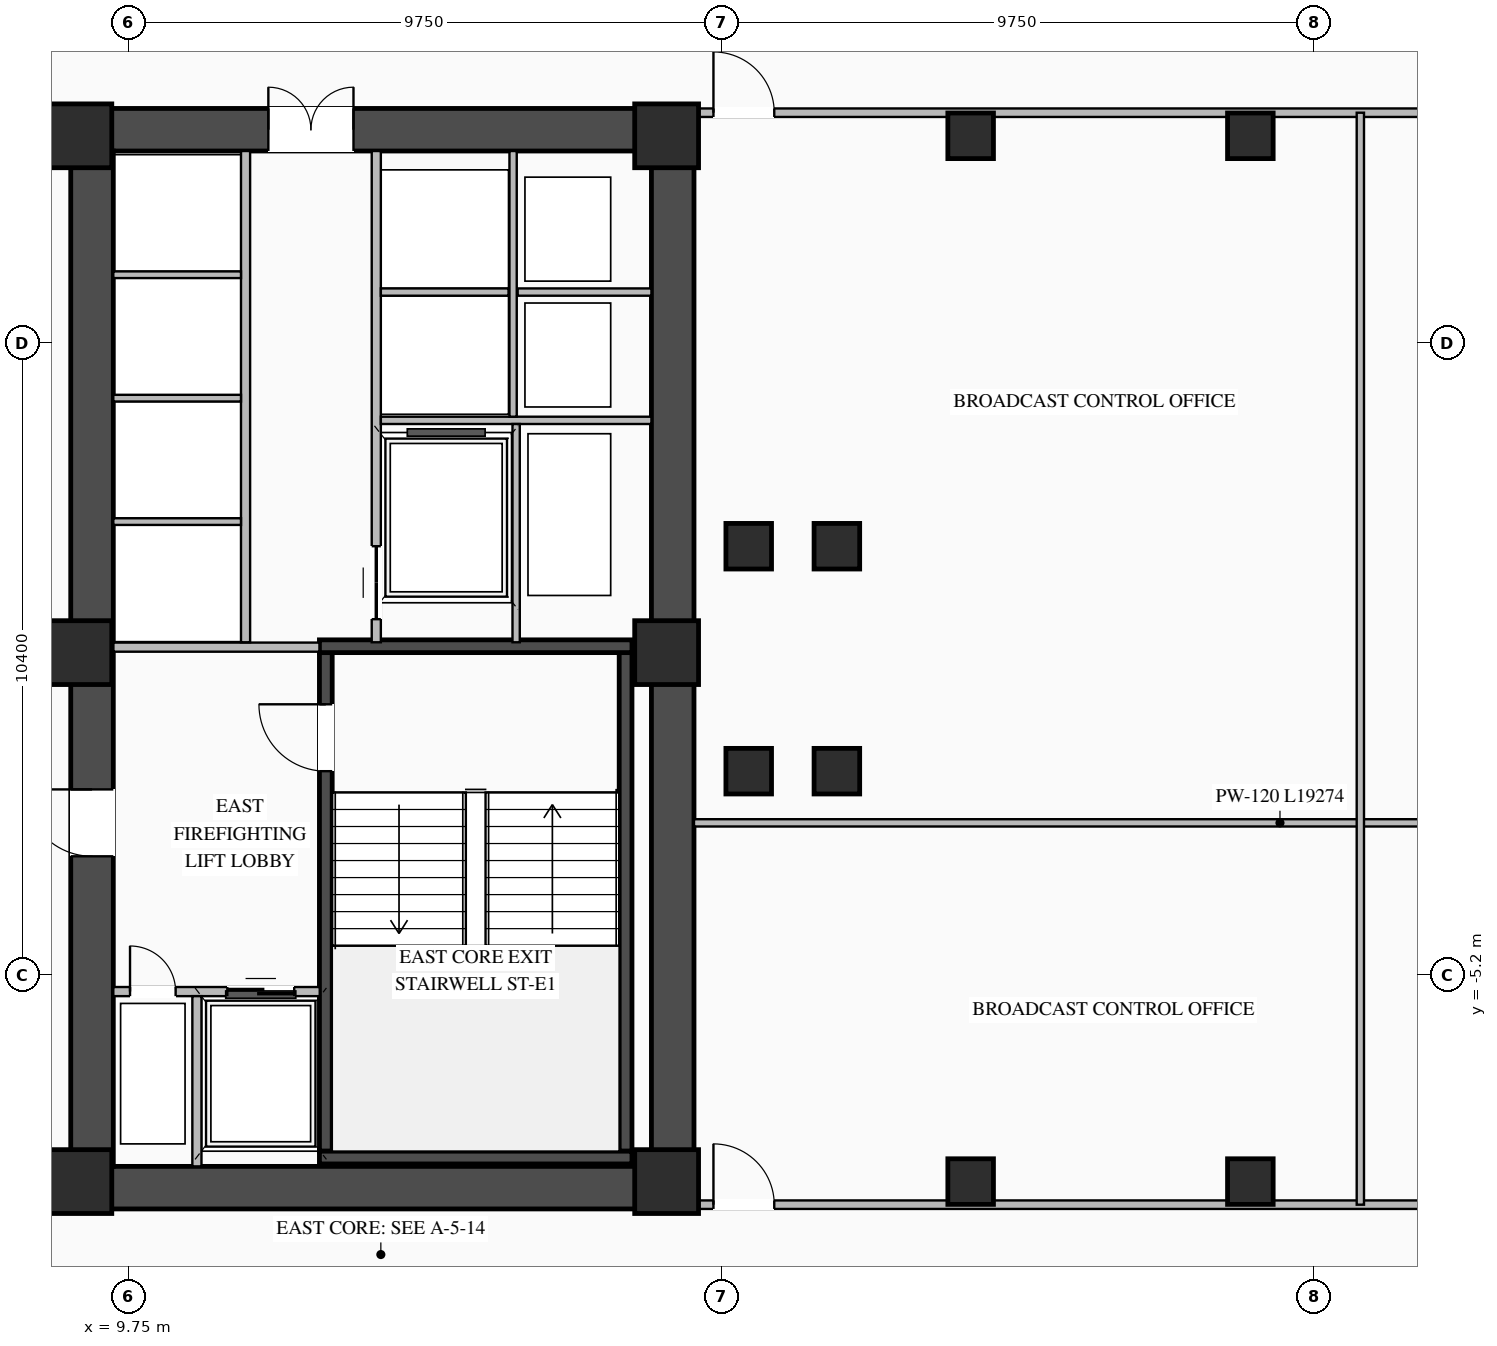
"""IFC4 building model, lengths in metres.
Left out: names, types, materials, properties, quantities, classifications, styles, units other than length and angle.
Written with IfcOpenShell. Run it as: python <this file> out.ifc"""

import sys

from ifc_helpers import new_model, si_unit, direction, frame, frame_2d, origin, origin_2d, place, context, subcontext, project, spatial, rectangle, i_section, extrude, element, fill, save


model = new_model("IFC4")
c1 = context("Model", 3, precision=1e-05, world=origin(), true_north=direction((0.0, 1.0)))
c2 = subcontext(c1, "Body", "Model", "MODEL_VIEW")
j1 = project(units=[si_unit("LENGTHUNIT", "METRE"), si_unit("PLANEANGLEUNIT", "RADIAN")], contexts=[c1])
p1 = place(None, origin())
s1 = spatial("IfcSite", under=j1, at=p1, CompositionType="ELEMENT")
p2 = place(p1, origin())
s2 = spatial("IfcBuilding", under=s1, at=p2, CompositionType="ELEMENT")
p3 = place(p2, frame((0.0, 0.0, 74.2)))
s3 = spatial("IfcBuildingStorey", under=s2, at=p3, CompositionType="ELEMENT", Elevation=74.2)
p4 = place(p3, frame((8.8, -8.7, 0.0), z_axis=(0.0, 0.0, 1.0), x_axis=(1.0, 0.0, 0.0)))
e1 = element("IfcWall", 1, at=p4, inside=s3, PredefinedType="SHEAR", context=c2, shape_type="SweptSolid", body=[
    extrude(rectangle(XDim=10.25, YDim=0.7, at=frame_2d((5.125, 0.0))), origin(), (0.0, 0.0, 1.0), 3.27),
])
p5 = place(p3, frame((8.8, 8.7, 0.0), z_axis=(0.0, 0.0, 1.0), x_axis=(1.0, 0.0, 0.0)))
e2 = element("IfcWall", 2, at=p5, inside=s3, PredefinedType="SHEAR", context=c2, shape_type="SweptSolid", body=[
    extrude(rectangle(XDim=10.25, YDim=0.7, at=frame_2d((5.125, 0.0))), origin(), (0.0, 0.0, 1.0), 3.27),
])
p6 = place(p5, frame((3.25, 0.0, 0.0)))
e3 = element("IfcOpeningElement", 3, at=p6, cuts=e2, PredefinedType="OPENING", context=c2, shape_type="SweptSolid", body=[
    extrude(rectangle(XDim=1.4, YDim=2.05, at=frame_2d((0.7, 1.025))), frame((0.0, 0.36, 0.0), z_axis=(0.0, -1.0, 0.0), x_axis=(1.0, 0.0, 0.0)), (0.0, 0.0, 1.0), 0.72),
])
p7 = place(p3, frame((9.15, -8.35, 0.0), z_axis=(0.0, 0.0, 1.0), x_axis=(0.0, 1.0, 0.0)))
e4 = element("IfcWall", 4, at=p7, inside=s3, PredefinedType="SHEAR", context=c2, shape_type="SweptSolid", body=[
    extrude(rectangle(XDim=16.7, YDim=0.7, at=frame_2d((8.35, 0.0))), origin(), (0.0, 0.0, 1.0), 3.27),
])
p8 = place(p7, frame((5.1, 0.0, 0.0)))
e5 = element("IfcOpeningElement", 5, at=p8, cuts=e4, PredefinedType="OPENING", context=c2, shape_type="SweptSolid", body=[
    extrude(rectangle(XDim=1.1, YDim=2.08, at=frame_2d((0.55, 1.04))), frame((0.0, 0.36, 0.0), z_axis=(0.0, -1.0, 0.0), x_axis=(1.0, 0.0, 0.0)), (0.0, 0.0, 1.0), 0.72),
])
p9 = place(p3, frame((18.7, -8.35, 0.0), z_axis=(0.0, 0.0, 1.0), x_axis=(0.0, 1.0, 0.0)))
e6 = element("IfcWall", 6, at=p9, inside=s3, PredefinedType="SHEAR", context=c2, shape_type="SweptSolid", body=[
    extrude(rectangle(XDim=16.7, YDim=0.7, at=frame_2d((8.35, 0.0))), origin(), (0.0, 0.0, 1.0), 3.27),
])
p10 = place(p3, frame((12.995, -8.1, 0.0), z_axis=(0.0, 0.0, 1.0), x_axis=(0.0, 1.0, 0.0)))
e7 = element("IfcWall", 7, at=p10, inside=s3, PredefinedType="SHEAR", context=c2, shape_type="SweptSolid", body=[
    extrude(rectangle(XDim=8.2, YDim=0.21, at=frame_2d((4.1, 0.0))), origin(), (0.0, 0.0, 1.0), 3.27),
])
p11 = place(p10, frame((6.25, 0.0, 0.0)))
e8 = element("IfcOpeningElement", 8, at=p11, cuts=e7, PredefinedType="OPENING", context=c2, shape_type="SweptSolid", body=[
    extrude(rectangle(XDim=1.1, YDim=2.15, at=frame_2d((0.55, 1.075))), frame((0.0, 0.115, 0.0), z_axis=(0.0, -1.0, 0.0), x_axis=(1.0, 0.0, 0.0)), (0.0, 0.0, 1.0), 0.23),
])
p12 = place(p3, frame((17.925, -8.1, 0.0), z_axis=(0.0, 0.0, 1.0), x_axis=(0.0, 1.0, 0.0)))
e9 = element("IfcWall", 9, at=p12, inside=s3, PredefinedType="SHEAR", context=c2, shape_type="SweptSolid", body=[
    extrude(rectangle(XDim=8.2, YDim=0.21, at=frame_2d((4.1, 0.0))), origin(), (0.0, 0.0, 1.0), 3.27),
])
for number, where, z_axis, x_axis in (
    (10, (12.89, -8.205, 0.0), (0.0, 0.0, 1.0), (1.0, 0.0, 0.0)),
    (11, (18.03, 0.205, 0.0), (0.0, 0.0, 1.0), (-1.0, 0.0, 0.0)),
):
    element("IfcWall", number, at=place(p3, frame(where, z_axis=z_axis, x_axis=x_axis)), inside=s3, PredefinedType="SHEAR", context=c2, shape_type="SweptSolid", body=[
        extrude(rectangle(XDim=5.14, YDim=0.21, at=frame_2d((2.57, 0.0))), origin(), (0.0, 0.0, 1.0), 3.27),
    ])
for number, where, z_axis, x_axis in (
    (12, (8.95, -8.6, 0.0), (0.0, 0.0, 1.0), (1.0, 0.0, 0.0)),
    (13, (8.95, 0.1, 0.0), (0.0, 0.0, 1.0), (1.0, 0.0, 0.0)),
    (14, (8.95, 8.6, 0.0), (0.0, 0.0, 1.0), (1.0, 0.0, 0.0)),
    (15, (18.6, -8.6, 0.0), (0.0, 0.0, 1.0), (1.0, 0.0, 0.0)),
    (16, (18.6, 0.1, 0.0), (0.0, 0.0, 1.0), (1.0, 0.0, 0.0)),
    (17, (18.6, 8.6, 0.0), (0.0, 0.0, 1.0), (1.0, 0.0, 0.0)),
):
    element("IfcColumn", number, at=place(p3, frame(where, z_axis=z_axis, x_axis=x_axis)), inside=s3, PredefinedType="COLUMN", context=c2, shape_type="SweptSolid", body=[
        extrude(rectangle(XDim=1.05, YDim=1.05, at=origin_2d()), origin(), (0.0, 0.0, 1.0), 3.45),
    ])
for number, where, z_axis, x_axis in (
    (18, (19.95, -1.85, 0.0), (0.0, 0.0, 1.0), (1.0, 0.0, 0.0)),
    (19, (19.95, 1.85, 0.0), (0.0, 0.0, 1.0), (1.0, 0.0, 0.0)),
    (20, (21.4, -1.85, 0.0), (0.0, 0.0, 1.0), (1.0, 0.0, 0.0)),
    (21, (21.4, 1.85, 0.0), (0.0, 0.0, 1.0), (1.0, 0.0, 0.0)),
    (22, (23.6, -8.6, 0.0), (0.0, 0.0, 1.0), (1.0, 0.0, 0.0)),
    (23, (23.6, 8.6, 0.0), (0.0, 0.0, 1.0), (1.0, 0.0, 0.0)),
    (24, (28.2, -8.6, 0.0), (0.0, 0.0, 1.0), (1.0, 0.0, 0.0)),
    (25, (28.2, 8.6, 0.0), (0.0, 0.0, 1.0), (1.0, 0.0, 0.0)),
):
    element("IfcColumn", number, at=place(p3, frame(where, z_axis=z_axis, x_axis=x_axis)), inside=s3, PredefinedType="COLUMN", context=c2, shape_type="SweptSolid", body=[
        extrude(i_section(OverallWidth=0.75, OverallDepth=0.75, WebThickness=0.03, FlangeThickness=0.044, at=origin_2d()), origin(), (0.0, 0.0, 1.0), 3.45),
    ])
p13 = place(p3, frame((9.5, -5.475, 0.0), z_axis=(0.0, 0.0, 1.0), x_axis=(1.0, 0.0, 0.0)))
e26 = element("IfcWall", 26, at=p13, inside=s3, PredefinedType="STANDARD", context=c2, shape_type="SweptSolid", body=[
    extrude(rectangle(XDim=3.395, YDim=0.15, at=frame_2d((1.698, 0.0))), origin(), (0.0, 0.0, 1.0), 3.25),
])
p14 = place(p13, frame((1.875, 0.0, 0.0)))
e27 = element("IfcOpeningElement", 27, at=p14, cuts=e26, PredefinedType="OPENING", context=c2, shape_type="SweptSolid", body=[
    extrude(rectangle(XDim=1.1, YDim=2.15, at=frame_2d((0.55, 1.075))), frame((0.0, 0.085, 0.0), z_axis=(0.0, -1.0, 0.0), x_axis=(1.0, 0.0, 0.0)), (0.0, 0.0, 1.0), 0.17),
])
p15 = place(p13, frame((0.275, 0.0, 0.0)))
e28 = element("IfcOpeningElement", 28, at=p15, cuts=e26, PredefinedType="OPENING", context=c2, shape_type="SweptSolid", body=[
    extrude(rectangle(XDim=0.75, YDim=2.05, at=frame_2d((0.375, 1.025))), frame((0.0, 0.085, 0.0), z_axis=(0.0, -1.0, 0.0), x_axis=(1.0, 0.0, 0.0)), (0.0, 0.0, 1.0), 0.17),
])
p16 = place(p3, frame((10.875, -8.35, 0.0), z_axis=(0.0, 0.0, 1.0), x_axis=(0.0, 1.0, 0.0)))
e29 = element("IfcWall", 29, at=p16, inside=s3, PredefinedType="STANDARD", context=c2, shape_type="SweptSolid", body=[
    extrude(rectangle(XDim=2.8, YDim=0.15, at=frame_2d((1.4, 0.0))), origin(), (0.0, 0.0, 1.0), 3.25),
])
p17 = place(p3, frame((9.5, 0.19, 0.0), z_axis=(0.0, 0.0, 1.0), x_axis=(1.0, 0.0, 0.0)))
e30 = element("IfcWall", 30, at=p17, inside=s3, PredefinedType="STANDARD", context=c2, shape_type="SweptSolid", body=[
    extrude(rectangle(XDim=3.39, YDim=0.15, at=frame_2d((1.695, 0.0))), origin(), (0.0, 0.0, 1.0), 2.645),
])
p18 = place(p3, frame((11.675, 0.27, 0.0), z_axis=(0.0, 0.0, 1.0), x_axis=(0.0, 1.0, 0.0)))
e31 = element("IfcWall", 31, at=p18, inside=s3, PredefinedType="STANDARD", context=c2, shape_type="SweptSolid", body=[
    extrude(rectangle(XDim=8.08, YDim=0.15, at=frame_2d((4.04, 0.0))), origin(), (0.0, 0.0, 1.0), 3.25),
])
for number, where, z_axis, x_axis in (
    (32, (9.5, 2.255, 0.0), (0.0, 0.0, 1.0), (1.0, 0.0, 0.0)),
    (33, (9.5, 4.285, 0.0), (0.0, 0.0, 1.0), (1.0, 0.0, 0.0)),
    (34, (9.5, 6.315, 0.0), (0.0, 0.0, 1.0), (1.0, 0.0, 0.0)),
):
    element("IfcWall", number, at=place(p3, frame(where, z_axis=z_axis, x_axis=x_axis)), inside=s3, PredefinedType="STANDARD", context=c2, shape_type="SweptSolid", body=[
        extrude(rectangle(XDim=2.1, YDim=0.11, at=frame_2d((1.05, 0.0))), origin(), (0.0, 0.0, 1.0), 3.25),
    ])
p19 = place(p3, frame((13.825, 0.27, 0.0), z_axis=(0.0, 0.0, 1.0), x_axis=(0.0, 1.0, 0.0)))
e35 = element("IfcWall", 35, at=p19, inside=s3, PredefinedType="STANDARD", context=c2, shape_type="SweptSolid", body=[
    extrude(rectangle(XDim=8.08, YDim=0.15, at=frame_2d((4.04, 0.0))), origin(), (0.0, 0.0, 1.0), 3.25),
])
p20 = place(p19, frame((0.38, 0.0, 0.0)))
e36 = element("IfcOpeningElement", 36, at=p20, cuts=e35, PredefinedType="OPENING", context=c2, shape_type="SweptSolid", body=[
    extrude(rectangle(XDim=1.2, YDim=2.1, at=frame_2d((0.6, 1.05))), frame((0.0, 0.085, 0.0), z_axis=(0.0, -1.0, 0.0), x_axis=(1.0, 0.0, 0.0)), (0.0, 0.0, 1.0), 0.17),
])
p21 = place(p3, frame((13.9, 3.92, 0.0), z_axis=(0.0, 0.0, 1.0), x_axis=(1.0, 0.0, 0.0)))
e37 = element("IfcWall", 37, at=p21, inside=s3, PredefinedType="STANDARD", context=c2, shape_type="SweptSolid", body=[
    extrude(rectangle(XDim=4.45, YDim=0.12, at=frame_2d((2.225, 0.0))), origin(), (0.0, 0.0, 1.0), 3.25),
])
p22 = place(p3, frame((16.15, 6.03, 0.0), z_axis=(0.0, 0.0, 1.0), x_axis=(1.0, 0.0, 0.0)))
e38 = element("IfcWall", 38, at=p22, inside=s3, PredefinedType="STANDARD", context=c2, shape_type="SweptSolid", body=[
    extrude(rectangle(XDim=2.2, YDim=0.12, at=frame_2d((1.1, 0.0))), origin(), (0.0, 0.0, 1.0), 3.25),
])
p23 = place(p3, frame((16.075, 3.98, 0.0), z_axis=(0.0, 0.0, 1.0), x_axis=(0.0, 1.0, 0.0)))
e39 = element("IfcWall", 39, at=p23, inside=s3, PredefinedType="STANDARD", context=c2, shape_type="SweptSolid", body=[
    extrude(rectangle(XDim=4.37, YDim=0.12, at=frame_2d((2.185, 0.0))), origin(), (0.0, 0.0, 1.0), 3.25),
])
p24 = place(p3, frame((13.9, 6.03, 0.0), z_axis=(0.0, 0.0, 1.0), x_axis=(1.0, 0.0, 0.0)))
e40 = element("IfcWall", 40, at=p24, inside=s3, PredefinedType="STANDARD", context=c2, shape_type="SweptSolid", body=[
    extrude(rectangle(XDim=2.1, YDim=0.12, at=frame_2d((1.05, 0.0))), origin(), (0.0, 0.0, 1.0), 3.25),
])
p25 = place(p3, frame((16.125, 0.27, 0.0), z_axis=(0.0, 0.0, 1.0), x_axis=(0.0, 1.0, 0.0)))
e41 = element("IfcWall", 41, at=p25, inside=s3, PredefinedType="STANDARD", context=c2, shape_type="SweptSolid", body=[
    extrude(rectangle(XDim=3.59, YDim=0.12, at=frame_2d((1.795, 0.0))), origin(), (0.0, 0.0, 1.0), 3.25),
])
p26 = place(p3, frame((19.05, 8.98, 0.0), z_axis=(0.0, 0.0, 1.0), x_axis=(1.0, 0.0, 0.0)))
e42 = element("IfcWall", 42, at=p26, inside=s3, PredefinedType="STANDARD", context=c2, shape_type="SweptSolid", body=[
    extrude(rectangle(XDim=18.15, YDim=0.14, at=frame_2d((9.075, 0.0))), origin(), (0.0, 0.0, 1.0), 3.25),
])
p27 = place(p26, frame((0.32, 0.0, 0.0)))
e43 = element("IfcOpeningElement", 43, at=p27, cuts=e42, PredefinedType="OPENING", context=c2, shape_type="SweptSolid", body=[
    extrude(rectangle(XDim=1.0, YDim=2.08, at=frame_2d((0.5, 1.04))), frame((0.0, 0.08, 0.0), z_axis=(0.0, -1.0, 0.0), x_axis=(1.0, 0.0, 0.0)), (0.0, 0.0, 1.0), 0.16),
])
p28 = place(p26, frame((13.924, 0.0, 0.0)))
e44 = element("IfcOpeningElement", 44, at=p28, cuts=e42, PredefinedType="OPENING", context=c2, shape_type="SweptSolid", body=[
    extrude(rectangle(XDim=1.0, YDim=2.08, at=frame_2d((0.5, 1.04))), frame((0.0, 0.08, 0.0), z_axis=(0.0, -1.0, 0.0), x_axis=(1.0, 0.0, 0.0)), (0.0, 0.0, 1.0), 0.16),
])
p29 = place(p3, frame((19.05, -8.98, 0.0), z_axis=(0.0, 0.0, 1.0), x_axis=(1.0, 0.0, 0.0)))
e45 = element("IfcWall", 45, at=p29, inside=s3, PredefinedType="STANDARD", context=c2, shape_type="SweptSolid", body=[
    extrude(rectangle(XDim=19.879, YDim=0.14, at=frame_2d((9.939, 0.0))), origin(), (0.0, 0.0, 1.0), 3.25),
])
p30 = place(p29, frame((0.32, 0.0, 0.0)))
e46 = element("IfcOpeningElement", 46, at=p30, cuts=e45, PredefinedType="OPENING", context=c2, shape_type="SweptSolid", body=[
    extrude(rectangle(XDim=1.0, YDim=2.08, at=frame_2d((0.5, 1.04))), frame((0.0, 0.08, 0.0), z_axis=(0.0, -1.0, 0.0), x_axis=(1.0, 0.0, 0.0)), (0.0, 0.0, 1.0), 0.16),
])
p31 = place(p29, frame((14.789, 0.0, 0.0)))
e47 = element("IfcOpeningElement", 47, at=p31, cuts=e45, PredefinedType="OPENING", context=c2, shape_type="SweptSolid", body=[
    extrude(rectangle(XDim=1.0, YDim=2.08, at=frame_2d((0.5, 1.04))), frame((0.0, 0.08, 0.0), z_axis=(0.0, -1.0, 0.0), x_axis=(1.0, 0.0, 0.0)), (0.0, 0.0, 1.0), 0.16),
])
p32 = place(p3, frame((19.05, -2.7, 0.0), z_axis=(0.0, 0.0, 1.0), x_axis=(1.0, 0.0, 0.0)))
e48 = element("IfcWall", 48, at=p32, inside=s3, PredefinedType="STANDARD", context=c2, shape_type="SweptSolid", body=[
    extrude(rectangle(XDim=19.274, YDim=0.12, at=frame_2d((9.637, 0.0))), origin(), (0.0, 0.0, 1.0), 3.25),
])
p33 = place(p3, frame((30.009, -8.98, 0.0), z_axis=(0.0, 0.0, 1.0), x_axis=(0.0, 1.0, 0.0)))
e49 = element("IfcWall", 49, at=p33, inside=s3, PredefinedType="STANDARD", context=c2, shape_type="SweptSolid", body=[
    extrude(rectangle(XDim=17.96, YDim=0.12, at=frame_2d((8.98, 0.0))), origin(), (0.0, 0.0, 1.0), 3.25),
])
p34 = place(p11, origin())
e50 = element("IfcDoor", 50, at=p34, inside=s3, OperationType="SINGLE_SWING_RIGHT", PredefinedType="DOOR", context=c2, shape_type="SweptSolid", body=[
    extrude(rectangle(XDim=1.1, YDim=2.15, at=frame_2d((0.55, 1.075))), frame((0.0, 0.025, 0.0), z_axis=(0.0, -1.0, 0.0), x_axis=(1.0, 0.0, 0.0)), (0.0, 0.0, 1.0), 0.05),
])
fill(e8, e50)
p35 = place(p14, origin())
e51 = element("IfcDoor", 51, at=p35, inside=s3, OperationType="DOUBLE_DOOR_SLIDING", PredefinedType="DOOR", context=c2, shape_type="SweptSolid", body=[
    extrude(rectangle(XDim=1.1, YDim=2.15, at=frame_2d((0.55, 1.075))), frame((0.0, 0.025, 0.0), z_axis=(0.0, -1.0, 0.0), x_axis=(1.0, 0.0, 0.0)), (0.0, 0.0, 1.0), 0.05),
])
fill(e27, e51)
p36 = place(p15, origin())
e52 = element("IfcDoor", 52, at=p36, inside=s3, OperationType="SINGLE_SWING_LEFT", PredefinedType="DOOR", context=c2, shape_type="SweptSolid", body=[
    extrude(rectangle(XDim=0.75, YDim=2.05, at=frame_2d((0.375, 1.025))), frame((0.0, 0.025, 0.0), z_axis=(0.0, -1.0, 0.0), x_axis=(1.0, 0.0, 0.0)), (0.0, 0.0, 1.0), 0.05),
])
fill(e28, e52)
p37 = place(p8, origin())
e53 = element("IfcDoor", 53, at=p37, inside=s3, OperationType="SINGLE_SWING_RIGHT", PredefinedType="DOOR", context=c2, shape_type="SweptSolid", body=[
    extrude(rectangle(XDim=1.1, YDim=2.08, at=frame_2d((0.55, 1.04))), frame((0.0, -0.255, 0.0), z_axis=(0.0, -1.0, 0.0), x_axis=(1.0, 0.0, 0.0)), (0.0, 0.0, 1.0), 0.05),
])
fill(e5, e53)
p38 = place(p6, origin())
e54 = element("IfcDoor", 54, at=p38, inside=s3, OperationType="DOUBLE_DOOR_SINGLE_SWING", PredefinedType="DOOR", context=c2, shape_type="SweptSolid", body=[
    extrude(rectangle(XDim=1.4, YDim=2.05, at=frame_2d((0.7, 1.025))), frame((0.0, 0.295, 0.0), z_axis=(0.0, -1.0, 0.0), x_axis=(1.0, 0.0, 0.0)), (0.0, 0.0, 1.0), 0.05),
])
fill(e3, e54)
p39 = place(p20, origin())
e55 = element("IfcDoor", 55, at=p39, inside=s3, OperationType="DOUBLE_DOOR_SLIDING", PredefinedType="DOOR", context=c2, shape_type="SweptSolid", body=[
    extrude(rectangle(XDim=1.2, YDim=2.1, at=frame_2d((0.6, 1.05))), frame((0.0, 0.025, 0.0), z_axis=(0.0, -1.0, 0.0), x_axis=(1.0, 0.0, 0.0)), (0.0, 0.0, 1.0), 0.05),
])
fill(e36, e55)
p40 = place(p27, origin())
e56 = element("IfcDoor", 56, at=p40, inside=s3, OperationType="SINGLE_SWING_LEFT", PredefinedType="DOOR", context=c2, shape_type="SweptSolid", body=[
    extrude(rectangle(XDim=1.0, YDim=2.08, at=frame_2d((0.5, 1.04))), frame((0.0, 0.025, 0.0), z_axis=(0.0, -1.0, 0.0), x_axis=(1.0, 0.0, 0.0)), (0.0, 0.0, 1.0), 0.05),
])
fill(e43, e56)
p41 = place(p30, origin())
e57 = element("IfcDoor", 57, at=p41, inside=s3, OperationType="SINGLE_SWING_LEFT", PredefinedType="DOOR", context=c2, shape_type="SweptSolid", body=[
    extrude(rectangle(XDim=1.0, YDim=2.08, at=frame_2d((0.5, 1.04))), frame((0.0, 0.025, 0.0), z_axis=(0.0, -1.0, 0.0), x_axis=(1.0, 0.0, 0.0)), (0.0, 0.0, 1.0), 0.05),
])
fill(e46, e57)
save(model, sys.argv[1])
